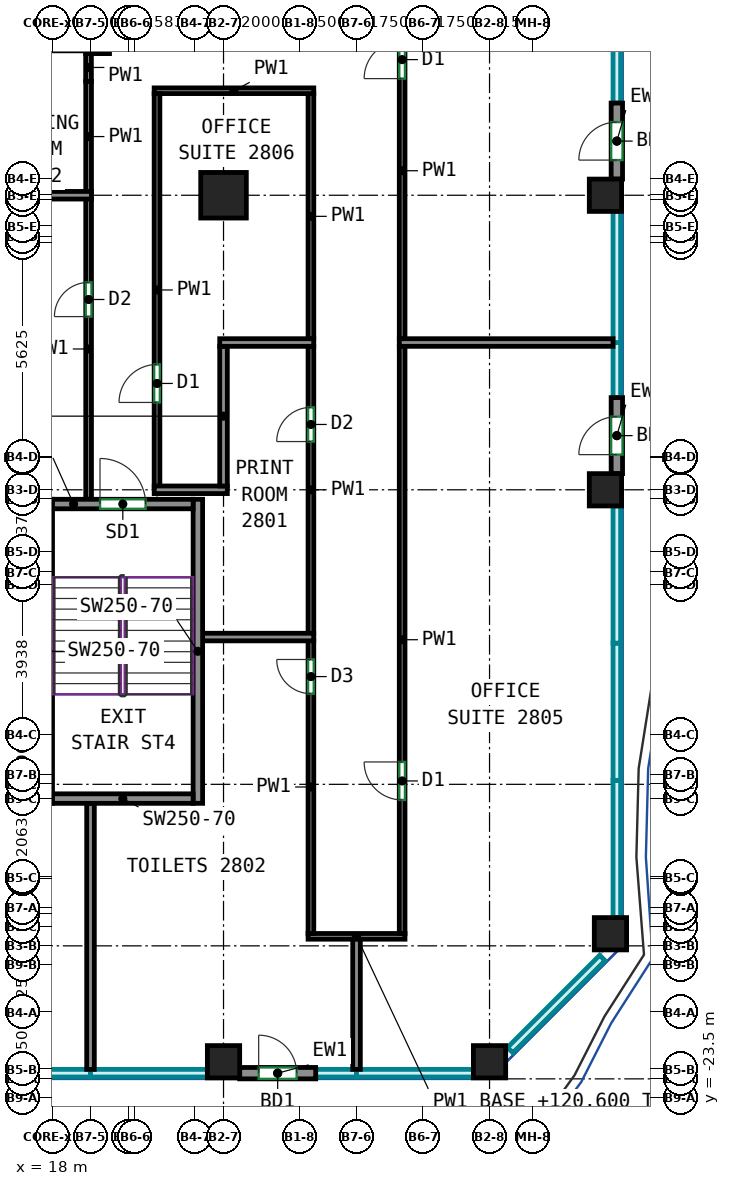
"""IFC4 building model, lengths in metres.
Left out: names, types, materials, properties, quantities, classifications, styles, units other than length and angle.
Written with IfcOpenShell. Run it as: python <this file> out.ifc"""

import sys

from ifc_helpers import new_model, si_unit, direction, frame, frame_2d, origin, origin_2d, place, context, subcontext, project, spatial, rectangle, extrude, source, transform, mapped, element, fill, save


model = new_model("IFC4")
c1 = context("Model", 3, precision=1e-05, world=origin(), true_north=direction((0.0, 1.0)))
c2 = subcontext(c1, "Body", "Model", "MODEL_VIEW")
j1 = project(units=[si_unit("LENGTHUNIT", "METRE"), si_unit("PLANEANGLEUNIT", "RADIAN")], contexts=[c1])
p1 = place(None, origin())
s1 = spatial("IfcSite", under=j1, at=p1, CompositionType="ELEMENT")
p2 = place(p1, origin())
s2 = spatial("IfcBuilding", under=s1, at=p2, CompositionType="ELEMENT")
p3 = place(p2, frame((0.0, 0.0, 120.6)))
s3 = spatial("IfcBuildingStorey", under=s2, at=p3, CompositionType="ELEMENT", Elevation=120.6)
m1 = source(origin(), c2, "Body", "SweptSolid", [
    extrude(rectangle(XDim=0.85, YDim=0.85, at=origin_2d()), origin(), (0.0, 0.0, 1.0), 3.72),
])
p4 = place(p3, frame((22.5, -22.55, 0.0), z_axis=(0.0, 0.0, 1.0), x_axis=(1.0, 0.0, 0.0)))
e1 = element("IfcColumn", 1, at=p4, inside=s3, PredefinedType="COLUMN", context=c2, shape_type="MappedRepresentation", body=[
    mapped(m1, transform((0.0, 0.0, 0.0))),
])
m2 = source(origin(), c2, "Body", "SweptSolid", [
    extrude(rectangle(XDim=1.2, YDim=1.2, at=origin_2d()), origin(), (0.0, 0.0, 1.0), 3.72),
])
p5 = place(p3, frame((22.5, 0.25, 0.0), z_axis=(0.0, 0.0, 1.0), x_axis=(1.0, 0.0, 0.0)))
e2 = element("IfcColumn", 2, at=p5, inside=s3, PredefinedType="COLUMN", context=c2, shape_type="MappedRepresentation", body=[
    mapped(m2, transform((0.0, 0.0, 0.0))),
])
for number, where, z_axis, x_axis in (
    (3, (29.5, -22.55, 0.0), (0.0, 0.0, 1.0), (1.0, 0.0, 0.0)),
    (4, (32.55, -7.5, 0.0), (0.0, 0.0, 1.0), (1.0, 0.0, 0.0)),
    (5, (32.55, 0.25, 0.0), (0.0, 0.0, 1.0), (1.0, 0.0, 0.0)),
    (6, (32.682, -19.182, 0.0), (0.0, 0.0, 1.0), (1.0, 0.0, 0.0)),
):
    element("IfcColumn", number, at=place(p3, frame(where, z_axis=z_axis, x_axis=x_axis)), inside=s3, PredefinedType="COLUMN", context=c2, shape_type="MappedRepresentation", body=[
        mapped(m1, transform((0.0, 0.0, 0.0))),
    ])
m3 = source(origin(), c2, "Body", "SweptSolid", [
    extrude(rectangle(XDim=8.0, YDim=0.25, at=frame_2d((4.0, 0.0))), origin(), (0.0, 0.0, 1.0), 3.72),
])
p6 = place(p3, frame((21.825, -15.75, 0.0), z_axis=(0.0, 0.0, 1.0), x_axis=(0.0, 1.0, 0.0)))
e7 = element("IfcWall", 7, at=p6, inside=s3, PredefinedType="SHEAR", context=c2, shape_type="MappedRepresentation", body=[
    mapped(m3, transform((0.0, 0.0, 0.0))),
])
m4 = source(origin(), c2, "Body", "SweptSolid", [
    extrude(rectangle(XDim=3.7, YDim=0.25, at=frame_2d((1.85, 0.0))), origin(), (0.0, 0.0, 1.0), 3.72),
])
p7 = place(p3, frame((18.0, -15.625, 0.0), z_axis=(0.0, 0.0, 1.0), x_axis=(1.0, 0.0, 0.0)))
e8 = element("IfcWall", 8, at=p7, inside=s3, PredefinedType="SHEAR", context=c2, shape_type="MappedRepresentation", body=[
    mapped(m4, transform((0.0, 0.0, 0.0))),
])
p8 = place(p3, frame((18.0, -7.875, 0.0), z_axis=(0.0, 0.0, 1.0), x_axis=(1.0, 0.0, 0.0)))
e9 = element("IfcWall", 9, at=p8, inside=s3, PredefinedType="SHEAR", context=c2, shape_type="MappedRepresentation", body=[
    mapped(m4, transform((0.0, 0.0, 0.0))),
])
p9 = place(p8, frame((1.25, 0.0, 0.0)))
e10 = element("IfcOpeningElement", 10, at=p9, cuts=e9, PredefinedType="OPENING", context=c2, shape_type="SweptSolid", body=[
    extrude(rectangle(XDim=1.2, YDim=2.1, at=frame_2d((0.6, 1.05))), frame((0.0, 0.135, 0.0), z_axis=(0.0, -1.0, 0.0), x_axis=(1.0, 0.0, 0.0)), (0.0, 0.0, 1.0), 0.27),
])
m5 = source(origin(), c2, "Body", "SweptSolid", [
    extrude(rectangle(XDim=2.0, YDim=0.3, at=frame_2d((1.0, 0.0))), origin(), (0.0, 0.0, 1.0), 3.72),
])
p10 = place(p3, frame((22.925, -22.85, 0.0), z_axis=(0.0, 0.0, 1.0), x_axis=(1.0, 0.0, 0.0)))
e11 = element("IfcWall", 11, at=p10, inside=s3, PredefinedType="SOLIDWALL", context=c2, shape_type="MappedRepresentation", body=[
    mapped(m5, transform((0.0, 0.0, 0.0))),
])
p11 = place(p10, frame((0.5, 0.0, 0.0)))
e12 = element("IfcOpeningElement", 12, at=p11, cuts=e11, PredefinedType="OPENING", context=c2, shape_type="SweptSolid", body=[
    extrude(rectangle(XDim=1.0, YDim=2.1, at=frame_2d((0.5, 1.05))), frame((0.0, 0.16, 0.0), z_axis=(0.0, -1.0, 0.0), x_axis=(1.0, 0.0, 0.0)), (0.0, 0.0, 1.0), 0.32),
])
p12 = place(p3, frame((32.85, -7.075, 0.0), z_axis=(0.0, 0.0, 1.0), x_axis=(0.0, 1.0, 0.0)))
e13 = element("IfcWall", 13, at=p12, inside=s3, PredefinedType="SOLIDWALL", context=c2, shape_type="MappedRepresentation", body=[
    mapped(m5, transform((0.0, 0.0, 0.0))),
])
p13 = place(p12, frame((0.5, 0.0, 0.0)))
e14 = element("IfcOpeningElement", 14, at=p13, cuts=e13, PredefinedType="OPENING", context=c2, shape_type="SweptSolid", body=[
    extrude(rectangle(XDim=1.0, YDim=2.1, at=frame_2d((0.5, 1.05))), frame((0.0, 0.16, 0.0), z_axis=(0.0, -1.0, 0.0), x_axis=(1.0, 0.0, 0.0)), (0.0, 0.0, 1.0), 0.32),
])
p14 = place(p3, frame((32.85, 0.675, 0.0), z_axis=(0.0, 0.0, 1.0), x_axis=(0.0, 1.0, 0.0)))
e15 = element("IfcWall", 15, at=p14, inside=s3, PredefinedType="SOLIDWALL", context=c2, shape_type="MappedRepresentation", body=[
    mapped(m5, transform((0.0, 0.0, 0.0))),
])
p15 = place(p14, frame((0.5, 0.0, 0.0)))
e16 = element("IfcOpeningElement", 16, at=p15, cuts=e15, PredefinedType="OPENING", context=c2, shape_type="SweptSolid", body=[
    extrude(rectangle(XDim=1.0, YDim=2.1, at=frame_2d((0.5, 1.05))), frame((0.0, 0.16, 0.0), z_axis=(0.0, -1.0, 0.0), x_axis=(1.0, 0.0, 0.0)), (0.0, 0.0, 1.0), 0.32),
])
p16 = place(p3, frame((18.95, -7.75, 0.0), z_axis=(0.0, 0.0, 1.0), x_axis=(0.0, 1.0, 0.0)))
e17 = element("IfcWall", 17, at=p16, inside=s3, PredefinedType="PARTITIONING", context=c2, shape_type="SweptSolid", body=[
    extrude(rectangle(XDim=7.91, YDim=0.15, at=frame_2d((3.955, 0.0))), origin(), (0.0, 0.0, 1.0), 3.72),
])
p17 = place(p16, frame((4.807, 0.0, 0.0)))
e18 = element("IfcOpeningElement", 18, at=p17, cuts=e17, PredefinedType="OPENING", context=c2, shape_type="SweptSolid", body=[
    extrude(rectangle(XDim=0.9, YDim=2.1, at=frame_2d((0.45, 1.05))), frame((0.0, 0.085, 0.0), z_axis=(0.0, -1.0, 0.0), x_axis=(1.0, 0.0, 0.0)), (0.0, 0.0, 1.0), 0.17),
])
p18 = place(p3, frame((24.725, -19.25, 0.0), z_axis=(0.0, 0.0, 1.0), x_axis=(1.0, 0.0, 0.0)))
e19 = element("IfcWall", 19, at=p18, inside=s3, PredefinedType="PARTITIONING", context=c2, shape_type="SweptSolid", body=[
    extrude(rectangle(XDim=2.55, YDim=0.15, at=frame_2d((1.275, 0.0))), origin(), (0.0, 0.0, 1.0), 3.07),
])
p19 = place(p3, frame((24.8, -19.175, 0.0), z_axis=(0.0, 0.0, 1.0), x_axis=(0.0, 1.0, 0.0)))
e20 = element("IfcWall", 20, at=p19, inside=s3, PredefinedType="PARTITIONING", context=c2, shape_type="SweptSolid", body=[
    extrude(rectangle(XDim=7.71, YDim=0.15, at=frame_2d((3.855, 0.0))), origin(), (0.0, 0.0, 1.0), 3.72),
])
p20 = place(p19, frame((6.31, 0.0, 0.0)))
e21 = element("IfcOpeningElement", 21, at=p20, cuts=e20, PredefinedType="OPENING", context=c2, shape_type="SweptSolid", body=[
    extrude(rectangle(XDim=0.9, YDim=2.1, at=frame_2d((0.45, 1.05))), frame((0.0, 0.085, 0.0), z_axis=(0.0, -1.0, 0.0), x_axis=(1.0, 0.0, 0.0)), (0.0, 0.0, 1.0), 0.17),
])
p21 = place(p3, frame((27.2, -19.175, 0.0), z_axis=(0.0, 0.0, 1.0), x_axis=(0.0, 1.0, 0.0)))
e22 = element("IfcWall", 22, at=p21, inside=s3, PredefinedType="PARTITIONING", context=c2, shape_type="SweptSolid", body=[
    extrude(rectangle(XDim=15.46, YDim=0.15, at=frame_2d((7.73, 0.0))), origin(), (0.0, 0.0, 1.0), 3.72),
])
p22 = place(p21, frame((3.514, 0.0, 0.0)))
e23 = element("IfcOpeningElement", 23, at=p22, cuts=e22, PredefinedType="OPENING", context=c2, shape_type="SweptSolid", body=[
    extrude(rectangle(XDim=1.0, YDim=2.1, at=frame_2d((0.5, 1.05))), frame((0.0, 0.085, 0.0), z_axis=(0.0, -1.0, 0.0), x_axis=(1.0, 0.0, 0.0)), (0.0, 0.0, 1.0), 0.17),
])
p23 = place(p3, frame((24.8, -11.285, 0.0), z_axis=(0.0, 0.0, 1.0), x_axis=(0.0, 1.0, 0.0)))
e24 = element("IfcWall", 24, at=p23, inside=s3, PredefinedType="PARTITIONING", context=c2, shape_type="SweptSolid", body=[
    extrude(rectangle(XDim=7.57, YDim=0.15, at=frame_2d((3.785, 0.0))), origin(), (0.0, 0.0, 1.0), 3.72),
])
p24 = place(p23, frame((5.054, 0.0, 0.0)))
e25 = element("IfcOpeningElement", 25, at=p24, cuts=e24, PredefinedType="OPENING", context=c2, shape_type="SweptSolid", body=[
    extrude(rectangle(XDim=0.9, YDim=2.1, at=frame_2d((0.45, 1.05))), frame((0.0, 0.085, 0.0), z_axis=(0.0, -1.0, 0.0), x_axis=(1.0, 0.0, 0.0)), (0.0, 0.0, 1.0), 0.17),
])
p25 = place(p3, frame((24.8, -3.535, 0.0), z_axis=(0.0, 0.0, 1.0), x_axis=(0.0, 1.0, 0.0)))
e26 = element("IfcWall", 26, at=p25, inside=s3, PredefinedType="PARTITIONING", context=c2, shape_type="SweptSolid", body=[
    extrude(rectangle(XDim=6.46, YDim=0.15, at=frame_2d((3.23, 0.0))), origin(), (0.0, 0.0, 1.0), 3.72),
])
p26 = place(p3, frame((20.675, 3.0, 0.0), z_axis=(0.0, 0.0, 1.0), x_axis=(1.0, 0.0, 0.0)))
e27 = element("IfcWall", 27, at=p26, inside=s3, PredefinedType="PARTITIONING", context=c2, shape_type="SweptSolid", body=[
    extrude(rectangle(XDim=4.2, YDim=0.15, at=frame_2d((2.1, 0.0))), origin(), (0.0, 0.0, 1.0), 3.72),
])
p27 = place(p3, frame((20.75, -7.41, 0.0), z_axis=(0.0, 0.0, 1.0), x_axis=(0.0, 1.0, 0.0)))
e28 = element("IfcWall", 28, at=p27, inside=s3, PredefinedType="PARTITIONING", context=c2, shape_type="SweptSolid", body=[
    extrude(rectangle(XDim=10.335, YDim=0.15, at=frame_2d((5.167, 0.0))), origin(), (0.0, 0.0, 1.0), 3.72),
])
p28 = place(p27, frame((2.208, 0.0, 0.0)))
e29 = element("IfcOpeningElement", 29, at=p28, cuts=e28, PredefinedType="OPENING", context=c2, shape_type="SweptSolid", body=[
    extrude(rectangle(XDim=1.0, YDim=2.1, at=frame_2d((0.5, 1.05))), frame((0.0, 0.085, 0.0), z_axis=(0.0, -1.0, 0.0), x_axis=(1.0, 0.0, 0.0)), (0.0, 0.0, 1.0), 0.17),
])
p29 = place(p3, frame((18.95, 0.34, 0.0), z_axis=(0.0, 0.0, 1.0), x_axis=(0.0, 1.0, 0.0)))
e30 = element("IfcWall", 30, at=p29, inside=s3, PredefinedType="PARTITIONING", context=c2, shape_type="SweptSolid", body=[
    extrude(rectangle(XDim=2.908, YDim=0.15, at=frame_2d((1.454, 0.0))), origin(), (0.0, 0.0, 1.0), 3.72),
])
p30 = place(p3, frame((18.948, 3.977, 0.0), z_axis=(0.0, 0.0, 1.0), x_axis=(0.0, -1.0, 0.0)))
e31 = element("IfcWall", 31, at=p30, inside=s3, PredefinedType="PARTITIONING", context=c2, shape_type="SweptSolid", body=[
    extrude(rectangle(XDim=0.729, YDim=0.15, at=frame_2d((0.365, 0.0))), origin(), (0.0, 0.0, 1.0), 3.72),
])
p31 = place(p3, frame((18.873, 4.052, 0.0), z_axis=(0.0, 0.0, 1.0), x_axis=(1.0, 0.0, 0.0)))
e32 = element("IfcWall", 32, at=p31, inside=s3, PredefinedType="PARTITIONING", context=c2, shape_type="SweptSolid", body=[
    extrude(rectangle(XDim=0.627, YDim=0.15, at=frame_2d((0.313, 0.0))), origin(), (0.0, 0.0, 1.0), 3.72),
])
p32 = place(p3, frame((27.2, -3.535, 0.0), z_axis=(0.0, 0.0, 1.0), x_axis=(0.0, 1.0, 0.0)))
e33 = element("IfcWall", 33, at=p32, inside=s3, PredefinedType="PARTITIONING", context=c2, shape_type="SweptSolid", body=[
    extrude(rectangle(XDim=8.86, YDim=0.15, at=frame_2d((4.43, 0.0))), origin(), (0.0, 0.0, 1.0), 3.72),
])
p33 = place(p32, frame((6.854, 0.0, 0.0)))
e34 = element("IfcOpeningElement", 34, at=p33, cuts=e33, PredefinedType="OPENING", context=c2, shape_type="SweptSolid", body=[
    extrude(rectangle(XDim=1.0, YDim=2.1, at=frame_2d((0.5, 1.05))), frame((0.0, 0.085, 0.0), z_axis=(0.0, -1.0, 0.0), x_axis=(1.0, 0.0, 0.0)), (0.0, 0.0, 1.0), 0.17),
])
p34 = place(p3, frame((19.0, -22.75, 0.0), z_axis=(0.0, 0.0, 1.0), x_axis=(0.0, 1.0, 0.0)))
e35 = element("IfcWall", 35, at=p34, inside=s3, PredefinedType="PARTITIONING", context=c2, shape_type="SweptSolid", body=[
    extrude(rectangle(XDim=7.0, YDim=0.2, at=frame_2d((3.5, 0.0))), origin(), (0.0, 0.0, 1.0), 3.72),
])
p35 = place(p3, frame((16.1, 0.25, 0.0), z_axis=(0.0, 0.0, 1.0), x_axis=(1.0, 0.0, 0.0)))
e36 = element("IfcWall", 36, at=p35, inside=s3, PredefinedType="PARTITIONING", context=c2, shape_type="SweptSolid", body=[
    extrude(rectangle(XDim=2.924, YDim=0.2, at=frame_2d((1.462, 0.0))), origin(), (0.0, 0.0, 1.0), 3.72),
])
p36 = place(p3, frame((26.0, -22.75, 0.0), z_axis=(0.0, 0.0, 1.0), x_axis=(0.0, 1.0, 0.0)))
e37 = element("IfcWall", 37, at=p36, inside=s3, PredefinedType="PARTITIONING", context=c2, shape_type="SweptSolid", body=[
    extrude(rectangle(XDim=3.424, YDim=0.2, at=frame_2d((1.712, 0.0))), origin(), (0.0, 0.0, 1.0), 3.72),
])
p37 = place(p3, frame((21.95, -11.375, 0.0), z_axis=(0.0, 0.0, 1.0), x_axis=(1.0, 0.0, 0.0)))
e38 = element("IfcWall", 38, at=p37, inside=s3, PredefinedType="PARTITIONING", context=c2, shape_type="SweptSolid", body=[
    extrude(rectangle(XDim=2.924, YDim=0.2, at=frame_2d((1.462, 0.0))), origin(), (0.0, 0.0, 1.0), 3.72),
])
p38 = place(p3, frame((27.126, -3.625, 0.0), z_axis=(0.0, 0.0, 1.0), x_axis=(1.0, 0.0, 0.0)))
e39 = element("IfcWall", 39, at=p38, inside=s3, PredefinedType="PARTITIONING", context=c2, shape_type="SweptSolid", body=[
    extrude(rectangle(XDim=5.624, YDim=0.2, at=frame_2d((2.812, 0.0))), origin(), (0.0, 0.0, 1.0), 3.72),
])
p39 = place(p3, frame((22.6, -7.5, 0.0), z_axis=(0.0, 0.0, 1.0), x_axis=(-1.0, 0.0, 0.0)))
e40 = element("IfcWall", 40, at=p39, inside=s3, PredefinedType="PARTITIONING", context=c2, shape_type="SweptSolid", body=[
    extrude(rectangle(XDim=1.924, YDim=0.2, at=frame_2d((0.962, 0.0))), origin(), (0.0, 0.0, 1.0), 3.72),
])
p40 = place(p3, frame((22.5, -3.725, 0.0), z_axis=(0.0, 0.0, 1.0), x_axis=(0.0, -1.0, 0.0)))
e41 = element("IfcWall", 41, at=p40, inside=s3, PredefinedType="PARTITIONING", context=c2, shape_type="SweptSolid", body=[
    extrude(rectangle(XDim=3.675, YDim=0.2, at=frame_2d((1.837, 0.0))), origin(), (0.0, 0.0, 1.0), 3.07),
])
p41 = place(p3, frame((22.4, -3.625, 0.0), z_axis=(0.0, 0.0, 1.0), x_axis=(1.0, 0.0, 0.0)))
e42 = element("IfcWall", 42, at=p41, inside=s3, PredefinedType="PARTITIONING", context=c2, shape_type="SweptSolid", body=[
    extrude(rectangle(XDim=2.474, YDim=0.2, at=frame_2d((1.237, 0.0))), origin(), (0.0, 0.0, 1.0), 3.72),
])
p42 = place(p11, origin())
e43 = element("IfcDoor", 43, at=p42, inside=s3, OperationType="SINGLE_SWING_LEFT", PredefinedType="DOOR", context=c2, shape_type="SweptSolid", body=[
    extrude(rectangle(XDim=1.0, YDim=2.1, at=frame_2d((0.5, 1.05))), frame((0.0, 0.025, 0.0), z_axis=(0.0, -1.0, 0.0), x_axis=(1.0, 0.0, 0.0)), (0.0, 0.0, 1.0), 0.05),
])
fill(e12, e43)
p43 = place(p13, origin())
e44 = element("IfcDoor", 44, at=p43, inside=s3, OperationType="SINGLE_SWING_LEFT", PredefinedType="DOOR", context=c2, shape_type="SweptSolid", body=[
    extrude(rectangle(XDim=1.0, YDim=2.1, at=frame_2d((0.5, 1.05))), frame((0.0, 0.025, 0.0), z_axis=(0.0, -1.0, 0.0), x_axis=(1.0, 0.0, 0.0)), (0.0, 0.0, 1.0), 0.05),
])
fill(e14, e44)
p44 = place(p15, origin())
e45 = element("IfcDoor", 45, at=p44, inside=s3, OperationType="SINGLE_SWING_LEFT", PredefinedType="DOOR", context=c2, shape_type="SweptSolid", body=[
    extrude(rectangle(XDim=1.0, YDim=2.1, at=frame_2d((0.5, 1.05))), frame((0.0, 0.025, 0.0), z_axis=(0.0, -1.0, 0.0), x_axis=(1.0, 0.0, 0.0)), (0.0, 0.0, 1.0), 0.05),
])
fill(e16, e45)
p45 = place(p9, origin())
e46 = element("IfcDoor", 46, at=p45, inside=s3, OperationType="DOUBLE_DOOR_SINGLE_SWING", PredefinedType="DOOR", context=c2, shape_type="SweptSolid", body=[
    extrude(rectangle(XDim=1.2, YDim=2.1, at=frame_2d((0.6, 1.05))), frame((0.0, 0.025, 0.0), z_axis=(0.0, -1.0, 0.0), x_axis=(1.0, 0.0, 0.0)), (0.0, 0.0, 1.0), 0.05),
])
fill(e10, e46)
p46 = place(p22, origin())
e47 = element("IfcDoor", 47, at=p46, inside=s3, OperationType="SINGLE_SWING_RIGHT", PredefinedType="DOOR", context=c2, shape_type="SweptSolid", body=[
    extrude(rectangle(XDim=1.0, YDim=2.1, at=frame_2d((0.5, 1.05))), frame((0.0, 0.025, 0.0), z_axis=(0.0, -1.0, 0.0), x_axis=(1.0, 0.0, 0.0)), (0.0, 0.0, 1.0), 0.05),
])
fill(e23, e47)
p47 = place(p20, origin())
e48 = element("IfcDoor", 48, at=p47, inside=s3, OperationType="SINGLE_SWING_RIGHT", PredefinedType="DOOR", context=c2, shape_type="SweptSolid", body=[
    extrude(rectangle(XDim=0.9, YDim=2.1, at=frame_2d((0.45, 1.05))), frame((0.0, 0.025, 0.0), z_axis=(0.0, -1.0, 0.0), x_axis=(1.0, 0.0, 0.0)), (0.0, 0.0, 1.0), 0.05),
])
fill(e21, e48)
p48 = place(p24, origin())
e49 = element("IfcDoor", 49, at=p48, inside=s3, OperationType="SINGLE_SWING_LEFT", PredefinedType="DOOR", context=c2, shape_type="SweptSolid", body=[
    extrude(rectangle(XDim=0.9, YDim=2.1, at=frame_2d((0.45, 1.05))), frame((0.0, 0.025, 0.0), z_axis=(0.0, -1.0, 0.0), x_axis=(1.0, 0.0, 0.0)), (0.0, 0.0, 1.0), 0.05),
])
fill(e25, e49)
p49 = place(p28, origin())
e50 = element("IfcDoor", 50, at=p49, inside=s3, OperationType="SINGLE_SWING_LEFT", PredefinedType="DOOR", context=c2, shape_type="SweptSolid", body=[
    extrude(rectangle(XDim=1.0, YDim=2.1, at=frame_2d((0.5, 1.05))), frame((0.0, 0.025, 0.0), z_axis=(0.0, -1.0, 0.0), x_axis=(1.0, 0.0, 0.0)), (0.0, 0.0, 1.0), 0.05),
])
fill(e29, e50)
p50 = place(p17, origin())
e51 = element("IfcDoor", 51, at=p50, inside=s3, OperationType="SINGLE_SWING_LEFT", PredefinedType="DOOR", context=c2, shape_type="SweptSolid", body=[
    extrude(rectangle(XDim=0.9, YDim=2.1, at=frame_2d((0.45, 1.05))), frame((0.0, 0.025, 0.0), z_axis=(0.0, -1.0, 0.0), x_axis=(1.0, 0.0, 0.0)), (0.0, 0.0, 1.0), 0.05),
])
fill(e18, e51)
p51 = place(p33, origin())
e52 = element("IfcDoor", 52, at=p51, inside=s3, OperationType="SINGLE_SWING_LEFT", PredefinedType="DOOR", context=c2, shape_type="SweptSolid", body=[
    extrude(rectangle(XDim=1.0, YDim=2.1, at=frame_2d((0.5, 1.05))), frame((0.0, 0.025, 0.0), z_axis=(0.0, -1.0, 0.0), x_axis=(1.0, 0.0, 0.0)), (0.0, 0.0, 1.0), 0.05),
])
fill(e34, e52)
save(model, sys.argv[1])
